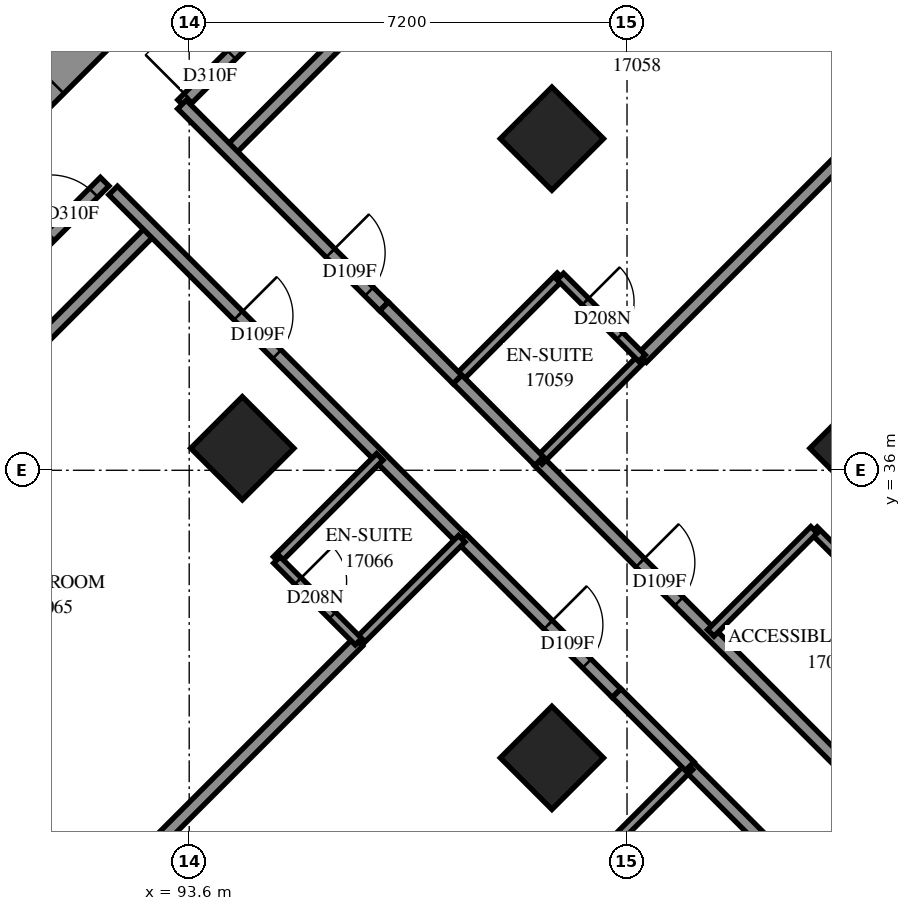
"""IFC4 building model, lengths in metres.
Left out: names, types, materials, properties, quantities, classifications, styles, units other than length and angle.
Written with IfcOpenShell. Run it as: python <this file> out.ifc"""

import sys

from ifc_helpers import new_model, si_unit, direction, frame, frame_2d, origin, origin_2d, place, context, subcontext, project, spatial, polyline, rectangle, outline, extrude, element, fill, save


model = new_model("IFC4")
c1 = context("Model", 3, precision=1e-05, world=origin(), true_north=direction((0.0, 1.0)))
c2 = subcontext(c1, "Body", "Model", "MODEL_VIEW")
j1 = project(units=[si_unit("LENGTHUNIT", "METRE"), si_unit("PLANEANGLEUNIT", "RADIAN")], contexts=[c1])
p1 = place(None, origin())
s1 = spatial("IfcSite", under=j1, at=p1, CompositionType="ELEMENT")
p2 = place(p1, origin())
s2 = spatial("IfcBuilding", under=s1, at=p2, CompositionType="ELEMENT")
p3 = place(p2, frame((0.0, 0.0, 64.4)))
s3 = spatial("IfcBuildingStorey", under=s2, at=p3, CompositionType="ELEMENT", Elevation=64.4)
for number, where, z_axis, x_axis in (
    (1, (99.565, 41.453, 0.0), (0.0, 0.0, 1.0), (0.707, -0.707, 0.0)),
    (2, (94.474, 36.362, 0.0), (0.0, 0.0, 1.0), (0.707, -0.707, 0.0)),
    (3, (104.656, 36.362, 0.0), (0.0, 0.0, 1.0), (0.707, -0.707, 0.0)),
    (4, (99.565, 31.271, 0.0), (0.0, 0.0, 1.0), (0.707, -0.707, 0.0)),
):
    element("IfcColumn", number, at=place(p3, frame(where, z_axis=z_axis, x_axis=x_axis)), inside=s3, PredefinedType="COLUMN", context=c2, shape_type="SweptSolid", body=[
        extrude(rectangle(XDim=1.2, YDim=1.2, at=origin_2d()), origin(), (0.0, 0.0, 1.0), 3.1),
    ])
p4 = place(p3, frame((87.19, 38.554, -0.3), z_axis=(0.0, 0.0, 1.0), x_axis=(0.707103309, 0.7071102534, 0.0)))
e5 = element("IfcWall", 5, at=p4, inside=s3, PredefinedType="SHEAR", context=c2, shape_type="SweptSolid", body=[
    extrude(rectangle(XDim=14.4, YDim=1.0, at=frame_2d((7.2, 0.0))), origin(), (0.0, 0.0, 1.0), 2.7),
])
p5 = place(p4, frame((4.55, 0.0, 0.3)))
e6 = element("IfcOpeningElement", 6, at=p5, cuts=e5, PredefinedType="OPENING", context=c2, shape_type="SweptSolid", body=[
    extrude(rectangle(XDim=1.1, YDim=2.1, at=frame_2d((0.55, 1.05))), frame((0.0, 0.51, 0.0), z_axis=(0.0, -1.0, 0.0), x_axis=(1.0, 0.0, 0.0)), (0.0, 0.0, 1.0), 1.02),
])
p6 = place(p4, frame((11.35, 0.0, 0.3)))
e7 = element("IfcOpeningElement", 7, at=p6, cuts=e5, PredefinedType="OPENING", context=c2, shape_type="SweptSolid", body=[
    extrude(rectangle(XDim=1.1, YDim=2.1, at=frame_2d((0.55, 1.05))), frame((0.0, 0.51, 0.0), z_axis=(0.0, -1.0, 0.0), x_axis=(1.0, 0.0, 0.0)), (0.0, 0.0, 1.0), 1.02),
])
p7 = place(p3, frame((88.005, 30.454, 0.0), z_axis=(0.0, 0.0, 1.0), x_axis=(0.8116253681, -0.5841782792, 0.0)))
e8 = element("IfcWall", 8, at=p7, inside=s3, PredefinedType="SOLIDWALL", context=c2, shape_type="SweptSolid", body=[
    extrude(outline(polyline([(-0.045, -0.275), (3.872, -0.275), (3.962, 0.275), (0.045, 0.275), (-0.045, -0.275)])), origin(), (0.0, 0.0, 1.0), 3.1),
])
p8 = place(p7, frame((0.659, 0.0, 0.5)))
e9 = element("IfcOpeningElement", 9, at=p8, cuts=e8, PredefinedType="OPENING", context=c2, shape_type="SweptSolid", body=[
    extrude(rectangle(XDim=2.8, YDim=2.45, at=frame_2d((1.4, 1.225))), frame((0.0, 0.285, 0.0), z_axis=(0.0, -1.0, 0.0), x_axis=(1.0, 0.0, 0.0)), (0.0, 0.0, 1.0), 0.57),
])
p9 = place(p3, frame((101.825, 31.125, 0.0), z_axis=(0.0, 0.0, 1.0), x_axis=(0.7071067812, -0.7071067812, 0.0)))
e10 = element("IfcWall", 10, at=p9, inside=s3, PredefinedType="PARTITIONING", context=c2, shape_type="SweptSolid", body=[
    extrude(rectangle(XDim=12.7, YDim=0.2, at=frame_2d((6.35, 0.0))), origin(), (0.0, 0.0, 1.0), 3.1),
])
p10 = place(p9, frame((3.895, 0.0, 0.0)))
e11 = element("IfcOpeningElement", 11, at=p10, cuts=e10, PredefinedType="OPENING", context=c2, shape_type="SweptSolid", body=[
    extrude(rectangle(XDim=0.9, YDim=2.1, at=frame_2d((0.45, 1.05))), frame((0.0, 0.11, 0.0), z_axis=(0.0, -1.0, 0.0), x_axis=(1.0, 0.0, 0.0)), (0.0, 0.0, 1.0), 0.22),
])
p11 = place(p9, frame((9.056, 0.0, 0.0)))
e12 = element("IfcOpeningElement", 12, at=p11, cuts=e10, PredefinedType="OPENING", context=c2, shape_type="SweptSolid", body=[
    extrude(rectangle(XDim=1.0, YDim=2.1, at=frame_2d((0.5, 1.05))), frame((0.0, 0.11, 0.0), z_axis=(0.0, -1.0, 0.0), x_axis=(1.0, 0.0, 0.0)), (0.0, 0.0, 1.0), 0.22),
])
p12 = place(p3, frame((94.259, 41.243, 0.0), z_axis=(0.0, 0.0, 1.0), x_axis=(0.7070206559, 0.7071928959, 0.0)))
e13 = element("IfcWall", 13, at=p12, inside=s3, PredefinedType="PARTITIONING", context=c2, shape_type="SweptSolid", body=[
    extrude(rectangle(XDim=12.192, YDim=0.2, at=frame_2d((6.096, 0.0))), origin(), (0.0, 0.0, 1.0), 3.1),
])
p13 = place(p3, frame((93.484, 42.02, 0.0), z_axis=(0.0, 0.0, 1.0), x_axis=(0.7071067812, 0.7071067812, 0.0)))
e14 = element("IfcWall", 14, at=p13, inside=s3, PredefinedType="PARTITIONING", context=c2, shape_type="SweptSolid", body=[
    extrude(rectangle(XDim=9.998, YDim=0.2, at=frame_2d((4.999, 0.0))), origin(), (0.0, 0.0, 1.0), 3.1),
])
p14 = place(p13, frame((0.148, 0.0, 0.0)))
e15 = element("IfcOpeningElement", 15, at=p14, cuts=e14, PredefinedType="OPENING", context=c2, shape_type="SweptSolid", body=[
    extrude(rectangle(XDim=1.0, YDim=2.1, at=frame_2d((0.5, 1.05))), frame((0.0, 0.11, 0.0), z_axis=(0.0, -1.0, 0.0), x_axis=(1.0, 0.0, 0.0)), (0.0, 0.0, 1.0), 0.22),
])
p15 = place(p3, frame((101.049, 37.847, 0.0), z_axis=(0.0, 0.0, 1.0), x_axis=(0.7071067812, 0.7071067812, 0.0)))
e16 = element("IfcWall", 16, at=p15, inside=s3, PredefinedType="PARTITIONING", context=c2, shape_type="SweptSolid", body=[
    extrude(rectangle(XDim=9.852, YDim=0.2, at=frame_2d((4.926, 0.0))), origin(), (0.0, 0.0, 1.0), 3.1),
])
p16 = place(p3, frame((86.309, 33.281, 0.0), z_axis=(0.0, 0.0, 1.0), x_axis=(0.7069956745, 0.7072178704, 0.0)))
e17 = element("IfcWall", 17, at=p16, inside=s3, PredefinedType="PARTITIONING", context=c2, shape_type="SweptSolid", body=[
    extrude(rectangle(XDim=9.451, YDim=0.2, at=frame_2d((4.726, 0.0))), origin(), (0.0, 0.0, 1.0), 3.1),
])
p17 = place(p3, frame((92.349, 40.601, 0.0), z_axis=(0.0, 0.0, 1.0), x_axis=(0.7071067812, -0.7071067812, 0.0)))
e18 = element("IfcWall", 18, at=p17, inside=s3, PredefinedType="PARTITIONING", context=c2, shape_type="SweptSolid", body=[
    extrude(rectangle(XDim=8.101, YDim=0.2, at=frame_2d((4.05, 0.0))), origin(), (0.0, 0.0, 1.0), 3.1),
])
p18 = place(p17, frame((2.909, 0.0, 0.0)))
e19 = element("IfcOpeningElement", 19, at=p18, cuts=e18, PredefinedType="OPENING", context=c2, shape_type="SweptSolid", body=[
    extrude(rectangle(XDim=0.9, YDim=2.1, at=frame_2d((0.45, 1.05))), frame((0.0, 0.11, 0.0), z_axis=(0.0, -1.0, 0.0), x_axis=(1.0, 0.0, 0.0)), (0.0, 0.0, 1.0), 0.22),
])
p19 = place(p3, frame((86.836, 35.372, 0.0), z_axis=(0.0, 0.0, 1.0), x_axis=(0.7071067812, 0.7071067812, 0.0)))
e20 = element("IfcWall", 20, at=p19, inside=s3, PredefinedType="PARTITIONING", context=c2, shape_type="SweptSolid", body=[
    extrude(rectangle(XDim=7.6, YDim=0.2, at=frame_2d((3.8, 0.0))), origin(), (0.0, 0.0, 1.0), 3.1),
])
p20 = place(p19, frame((6.342, 0.0, 0.0)))
e21 = element("IfcOpeningElement", 21, at=p20, cuts=e20, PredefinedType="OPENING", context=c2, shape_type="SweptSolid", body=[
    extrude(rectangle(XDim=1.0, YDim=2.1, at=frame_2d((0.5, 1.05))), frame((0.0, 0.11, 0.0), z_axis=(0.0, -1.0, 0.0), x_axis=(1.0, 0.0, 0.0)), (0.0, 0.0, 1.0), 0.22),
])
p21 = place(p3, frame((99.349, 36.147, 0.0), z_axis=(0.0, 0.0, 1.0), x_axis=(0.7071067812, -0.7071067812, 0.0)))
e22 = element("IfcWall", 22, at=p21, inside=s3, PredefinedType="PARTITIONING", context=c2, shape_type="SweptSolid", body=[
    extrude(rectangle(XDim=7.201, YDim=0.2, at=frame_2d((3.601, 0.0))), origin(), (0.0, 0.0, 1.0), 3.1),
])
p22 = place(p21, frame((2.358, 0.0, 0.0)))
e23 = element("IfcOpeningElement", 23, at=p22, cuts=e22, PredefinedType="OPENING", context=c2, shape_type="SweptSolid", body=[
    extrude(rectangle(XDim=0.9, YDim=2.1, at=frame_2d((0.45, 1.05))), frame((0.0, 0.11, 0.0), z_axis=(0.0, -1.0, 0.0), x_axis=(1.0, 0.0, 0.0)), (0.0, 0.0, 1.0), 0.22),
])
p23 = place(p3, frame((91.458, 28.256, 0.0), z_axis=(0.0, 0.0, 1.0), x_axis=(0.7071067812, 0.7071067812, 0.0)))
e24 = element("IfcWall", 24, at=p23, inside=s3, PredefinedType="PARTITIONING", context=c2, shape_type="SweptSolid", body=[
    extrude(rectangle(XDim=6.963, YDim=0.2, at=frame_2d((3.482, 0.0))), origin(), (0.0, 0.0, 1.0), 3.1),
])
p24 = place(p3, frame((93.481, 42.015, 0.0), z_axis=(0.0, 0.0, 1.0), x_axis=(0.7071067812, -0.7071067812, 0.0)))
e25 = element("IfcWall", 25, at=p24, inside=s3, PredefinedType="PARTITIONING", context=c2, shape_type="SweptSolid", body=[
    extrude(rectangle(XDim=4.698, YDim=0.2, at=frame_2d((2.349, 0.0))), origin(), (0.0, 0.0, 1.0), 3.1),
])
p25 = place(p24, frame((3.452, 0.0, 0.0)))
e26 = element("IfcOpeningElement", 26, at=p25, cuts=e25, PredefinedType="OPENING", context=c2, shape_type="SweptSolid", body=[
    extrude(rectangle(XDim=0.9, YDim=2.1, at=frame_2d((0.45, 1.05))), frame((0.0, 0.11, 0.0), z_axis=(0.0, -1.0, 0.0), x_axis=(1.0, 0.0, 0.0)), (0.0, 0.0, 1.0), 0.22),
])
p26 = place(p3, frame((98.082, 34.879, 0.0), z_axis=(0.0, 0.0, 1.0), x_axis=(0.7073845681, -0.7068288851, 0.0)))
e27 = element("IfcWall", 27, at=p26, inside=s3, PredefinedType="PARTITIONING", context=c2, shape_type="SweptSolid", body=[
    extrude(rectangle(XDim=3.599, YDim=0.2, at=frame_2d((1.8, 0.0))), origin(), (0.0, 0.0, 1.0), 3.1),
])
p27 = place(p26, frame((2.009, 0.0, 0.0)))
e28 = element("IfcOpeningElement", 28, at=p27, cuts=e27, PredefinedType="OPENING", context=c2, shape_type="SweptSolid", body=[
    extrude(rectangle(XDim=0.9, YDim=2.1, at=frame_2d((0.45, 1.05))), frame((0.0, 0.11, 0.0), z_axis=(0.0, -1.0, 0.0), x_axis=(1.0, 0.0, 0.0)), (0.0, 0.0, 1.0), 0.22),
])
p28 = place(p3, frame((103.875, 35.015, 0.0), z_axis=(0.0, 0.0, 1.0), x_axis=(0.7071067812, -0.7071067812, 0.0)))
e29 = element("IfcWall", 29, at=p28, inside=s3, PredefinedType="PARTITIONING", context=c2, shape_type="SweptSolid", body=[
    extrude(rectangle(XDim=3.199, YDim=0.15, at=frame_2d((1.599, 0.0))), origin(), (0.0, 0.0, 1.0), 3.1),
])
p29 = place(p28, frame((1.27, 0.0, 0.0)))
e30 = element("IfcOpeningElement", 30, at=p29, cuts=e29, PredefinedType="OPENING", context=c2, shape_type="SweptSolid", body=[
    extrude(rectangle(XDim=0.8, YDim=2.1, at=frame_2d((0.4, 1.05))), frame((0.0, 0.085, 0.0), z_axis=(0.0, -1.0, 0.0), x_axis=(1.0, 0.0, 0.0)), (0.0, 0.0, 1.0), 0.17),
])
p30 = place(p3, frame((100.129, 29.433, 0.0), z_axis=(0.0, 0.0, 1.0), x_axis=(0.7071067812, 0.7071067812, 0.0)))
e31 = element("IfcWall", 31, at=p30, inside=s3, PredefinedType="PARTITIONING", context=c2, shape_type="SweptSolid", body=[
    extrude(rectangle(XDim=2.401, YDim=0.15, at=frame_2d((1.201, 0.0))), origin(), (0.0, 0.0, 1.0), 3.1),
])
for number, where, z_axis, x_axis in (
    (32, (96.384, 33.178, 0.0), (0.0, 0.0, 1.0), (0.708, 0.707, 0.0)),
    (33, (99.349, 36.153, 0.0), (0.0, 0.0, 1.0), (0.708, 0.707, 0.0)),
    (34, (102.177, 33.325, 0.0), (0.0, 0.0, 1.0), (0.708, 0.707, 0.0)),
):
    element("IfcWall", number, at=place(p3, frame(where, z_axis=z_axis, x_axis=x_axis)), inside=s3, PredefinedType="PARTITIONING", context=c2, shape_type="SweptSolid", body=[
        extrude(rectangle(XDim=2.4, YDim=0.15, at=frame_2d((1.2, 0.0))), origin(), (0.0, 0.0, 1.0), 3.1),
    ])
for number, where, z_axis, x_axis in (
    (35, (95.039, 34.525, 0.0), (0.0, 0.0, 1.0), (0.707, 0.707, 0.0)),
    (36, (98.009, 37.495, 0.0), (0.0, 0.0, 1.0), (0.707, 0.707, 0.0)),
):
    element("IfcWall", number, at=place(p3, frame(where, z_axis=z_axis, x_axis=x_axis)), inside=s3, PredefinedType="PARTITIONING", context=c2, shape_type="SweptSolid", body=[
        extrude(rectangle(XDim=2.398, YDim=0.15, at=frame_2d((1.199, 0.0))), origin(), (0.0, 0.0, 1.0), 3.1),
    ])
p31 = place(p3, frame((99.703, 39.187, 0.0), z_axis=(0.0, 0.0, 1.0), x_axis=(0.7071067812, -0.7071067812, 0.0)))
e37 = element("IfcWall", 37, at=p31, inside=s3, PredefinedType="PARTITIONING", context=c2, shape_type="SweptSolid", body=[
    extrude(rectangle(XDim=1.901, YDim=0.15, at=frame_2d((0.95, 0.0))), origin(), (0.0, 0.0, 1.0), 3.1),
])
p32 = place(p31, frame((0.584, 0.0, 0.0)))
e38 = element("IfcOpeningElement", 38, at=p32, cuts=e37, PredefinedType="OPENING", context=c2, shape_type="SweptSolid", body=[
    extrude(rectangle(XDim=0.8, YDim=2.1, at=frame_2d((0.4, 1.05))), frame((0.0, 0.085, 0.0), z_axis=(0.0, -1.0, 0.0), x_axis=(1.0, 0.0, 0.0)), (0.0, 0.0, 1.0), 0.17),
])
p33 = place(p3, frame((98.012, 37.496, 0.0), z_axis=(0.0, 0.0, 1.0), x_axis=(0.7065800724, -0.7076330979, 0.0)))
e39 = element("IfcWall", 39, at=p33, inside=s3, PredefinedType="PARTITIONING", context=c2, shape_type="SweptSolid", body=[
    extrude(rectangle(XDim=1.899, YDim=0.2, at=frame_2d((0.95, 0.0))), origin(), (0.0, 0.0, 1.0), 3.1),
])
p34 = place(p3, frame((95.042, 34.526, 0.0), z_axis=(0.0, 0.0, 1.0), x_axis=(0.7065800724, -0.7076330979, 0.0)))
e40 = element("IfcWall", 40, at=p34, inside=s3, PredefinedType="PARTITIONING", context=c2, shape_type="SweptSolid", body=[
    extrude(rectangle(XDim=1.899, YDim=0.15, at=frame_2d((0.95, 0.0))), origin(), (0.0, 0.0, 1.0), 3.1),
])
p35 = place(p34, frame((0.491, 0.0, 0.0)))
e41 = element("IfcOpeningElement", 41, at=p35, cuts=e40, PredefinedType="OPENING", context=c2, shape_type="SweptSolid", body=[
    extrude(rectangle(XDim=0.8, YDim=2.1, at=frame_2d((0.4, 1.05))), frame((0.0, 0.085, 0.0), z_axis=(0.0, -1.0, 0.0), x_axis=(1.0, 0.0, 0.0)), (0.0, 0.0, 1.0), 0.17),
])
p36 = place(p3, frame((96.806, 38.696, 0.0), z_axis=(0.0, 0.0, 1.0), x_axis=(0.7076943229, -0.7065187509, 0.0)))
e42 = element("IfcWall", 42, at=p36, inside=s3, PredefinedType="PARTITIONING", context=c2, shape_type="SweptSolid", body=[
    extrude(rectangle(XDim=1.701, YDim=0.2, at=frame_2d((0.851, 0.0))), origin(), (0.0, 0.0, 1.0), 3.1),
])
p37 = place(p3, frame((100.629, 32.335, 0.0), z_axis=(0.0, 0.0, 1.0), x_axis=(0.7071067812, -0.7071067812, 0.0)))
e43 = element("IfcWall", 43, at=p37, inside=s3, PredefinedType="PARTITIONING", context=c2, shape_type="SweptSolid", body=[
    extrude(rectangle(XDim=1.7, YDim=0.2, at=frame_2d((0.85, 0.0))), origin(), (0.0, 0.0, 1.0), 3.1),
])
p38 = place(p14, origin())
e44 = element("IfcDoor", 44, at=p38, inside=s3, OperationType="SINGLE_SWING_LEFT", PredefinedType="DOOR", context=c2, shape_type="SweptSolid", body=[
    extrude(rectangle(XDim=1.0, YDim=2.1, at=frame_2d((0.5, 1.05))), frame((0.0, 0.025, 0.0), z_axis=(0.0, -1.0, 0.0), x_axis=(1.0, 0.0, 0.0)), (0.0, 0.0, 1.0), 0.05),
])
fill(e15, e44)
p39 = place(p25, origin())
e45 = element("IfcDoor", 45, at=p39, inside=s3, OperationType="SINGLE_SWING_RIGHT", PredefinedType="DOOR", context=c2, shape_type="SweptSolid", body=[
    extrude(rectangle(XDim=0.9, YDim=2.1, at=frame_2d((0.45, 1.05))), frame((0.0, 0.025, 0.0), z_axis=(0.0, -1.0, 0.0), x_axis=(1.0, 0.0, 0.0)), (0.0, 0.0, 1.0), 0.05),
])
fill(e26, e45)
p40 = place(p32, origin())
e46 = element("IfcDoor", 46, at=p40, inside=s3, OperationType="SINGLE_SWING_RIGHT", PredefinedType="DOOR", context=c2, shape_type="SweptSolid", body=[
    extrude(rectangle(XDim=0.8, YDim=2.1, at=frame_2d((0.4, 1.05))), frame((0.0, 0.025, 0.0), z_axis=(0.0, -1.0, 0.0), x_axis=(1.0, 0.0, 0.0)), (0.0, 0.0, 1.0), 0.05),
])
fill(e38, e46)
p41 = place(p22, origin())
e47 = element("IfcDoor", 47, at=p41, inside=s3, OperationType="SINGLE_SWING_RIGHT", PredefinedType="DOOR", context=c2, shape_type="SweptSolid", body=[
    extrude(rectangle(XDim=0.9, YDim=2.1, at=frame_2d((0.45, 1.05))), frame((0.0, 0.025, 0.0), z_axis=(0.0, -1.0, 0.0), x_axis=(1.0, 0.0, 0.0)), (0.0, 0.0, 1.0), 0.05),
])
fill(e23, e47)
p42 = place(p20, origin())
e48 = element("IfcDoor", 48, at=p42, inside=s3, OperationType="SINGLE_SWING_RIGHT", PredefinedType="DOOR", context=c2, shape_type="SweptSolid", body=[
    extrude(rectangle(XDim=1.0, YDim=2.1, at=frame_2d((0.5, 1.05))), frame((0.0, 0.025, 0.0), z_axis=(0.0, -1.0, 0.0), x_axis=(1.0, 0.0, 0.0)), (0.0, 0.0, 1.0), 0.05),
])
fill(e21, e48)
p43 = place(p18, origin())
e49 = element("IfcDoor", 49, at=p43, inside=s3, OperationType="SINGLE_SWING_LEFT", PredefinedType="DOOR", context=c2, shape_type="SweptSolid", body=[
    extrude(rectangle(XDim=0.9, YDim=2.1, at=frame_2d((0.45, 1.05))), frame((0.0, 0.025, 0.0), z_axis=(0.0, -1.0, 0.0), x_axis=(1.0, 0.0, 0.0)), (0.0, 0.0, 1.0), 0.05),
])
fill(e19, e49)
p44 = place(p35, origin())
e50 = element("IfcDoor", 50, at=p44, inside=s3, OperationType="SINGLE_SWING_RIGHT", PredefinedType="DOOR", context=c2, shape_type="SweptSolid", body=[
    extrude(rectangle(XDim=0.8, YDim=2.1, at=frame_2d((0.4, 1.05))), frame((0.0, 0.025, 0.0), z_axis=(0.0, -1.0, 0.0), x_axis=(1.0, 0.0, 0.0)), (0.0, 0.0, 1.0), 0.05),
])
fill(e41, e50)
p45 = place(p27, origin())
e51 = element("IfcDoor", 51, at=p45, inside=s3, OperationType="SINGLE_SWING_LEFT", PredefinedType="DOOR", context=c2, shape_type="SweptSolid", body=[
    extrude(rectangle(XDim=0.9, YDim=2.1, at=frame_2d((0.45, 1.05))), frame((0.0, 0.025, 0.0), z_axis=(0.0, -1.0, 0.0), x_axis=(1.0, 0.0, 0.0)), (0.0, 0.0, 1.0), 0.05),
])
fill(e28, e51)
save(model, sys.argv[1])
